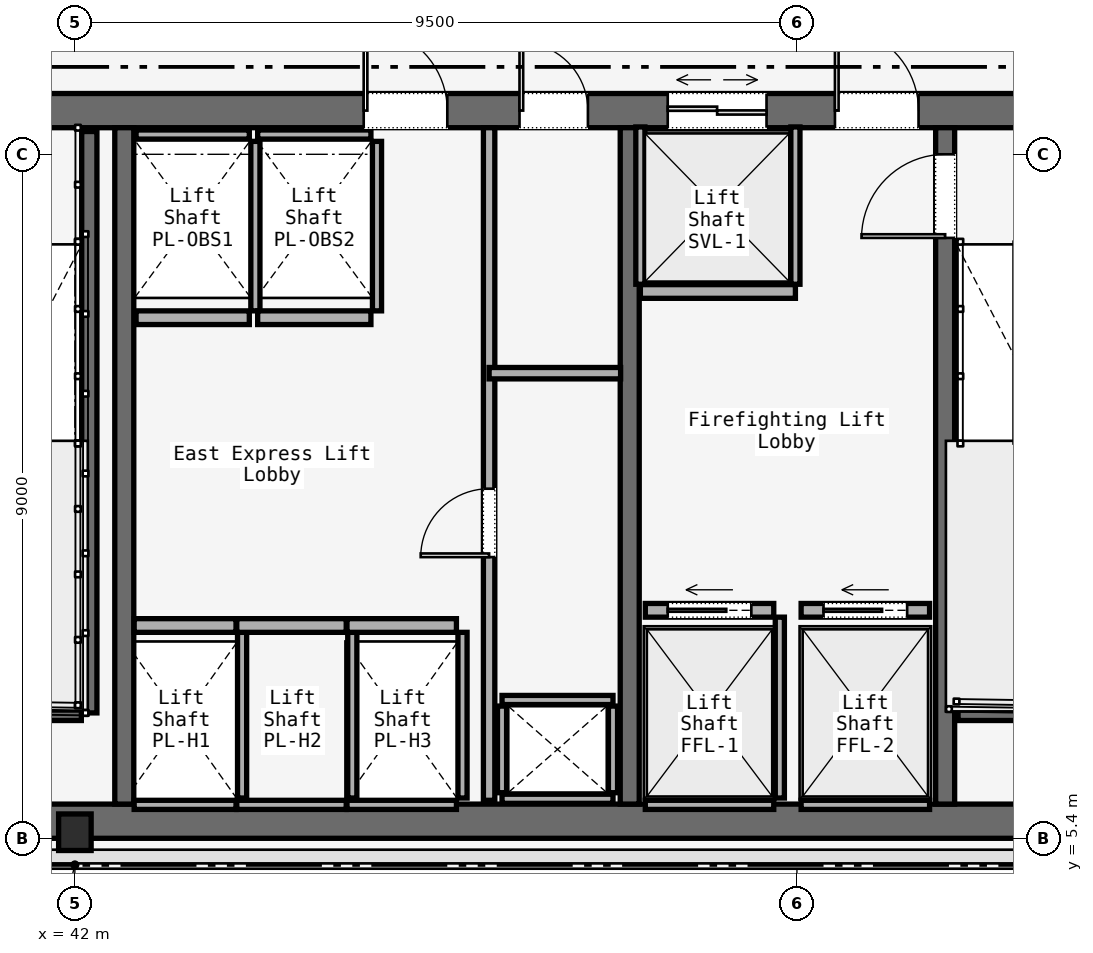
"""IFC4 building model, lengths in metres.
Left out: names, types, materials, properties, quantities, classifications, styles, units other than length and angle.
Written with IfcOpenShell. Run it as: python <this file> out.ifc"""

import sys

from ifc_helpers import new_model, si_unit, direction, frame, frame_2d, origin, origin_2d, place, context, subcontext, project, spatial, rectangle, i_section, extrude, element, fill, save


model = new_model("IFC4")
c1 = context("Model", 3, precision=1e-05, world=origin(), true_north=direction((0.0, 1.0)))
c2 = subcontext(c1, "Body", "Model", "MODEL_VIEW")
j1 = project(units=[si_unit("LENGTHUNIT", "METRE"), si_unit("PLANEANGLEUNIT", "RADIAN")], contexts=[c1])
p1 = place(None, origin())
s1 = spatial("IfcSite", under=j1, at=p1, CompositionType="ELEMENT")
p2 = place(p1, origin())
s2 = spatial("IfcBuilding", under=s1, at=p2, CompositionType="ELEMENT")
p3 = place(p2, frame((0.0, 0.0, 138.4)))
s3 = spatial("IfcBuildingStorey", under=s2, at=p3, CompositionType="ELEMENT", Elevation=138.4)
p4 = place(p3, frame((26.45, 14.975, 0.0), z_axis=(0.0, 0.0, 1.0), x_axis=(1.0, 0.0, 0.0)))
e1 = element("IfcWall", 1, at=p4, inside=s3, PredefinedType="SOLIDWALL", context=c2, shape_type="SweptSolid", body=[
    extrude(rectangle(XDim=31.1, YDim=0.45, at=frame_2d((15.55, 0.0))), origin(), (0.0, 0.0, 1.0), 3.58),
])
p5 = place(p4, frame((1.65, 0.0, 0.0)))
e2 = element("IfcOpeningElement", 2, at=p5, cuts=e1, PredefinedType="OPENING", context=c2, shape_type="SweptSolid", body=[
    extrude(rectangle(XDim=1.1, YDim=2.2, at=frame_2d((0.55, 1.1))), frame((0.0, 0.225, 0.0), z_axis=(0.0, -1.0, 0.0), x_axis=(1.0, 0.0, 0.0)), (0.0, 0.0, 1.0), 0.45),
])
p6 = place(p4, frame((13.65, 0.0, 0.0)))
e3 = element("IfcOpeningElement", 3, at=p6, cuts=e1, PredefinedType="OPENING", context=c2, shape_type="SweptSolid", body=[
    extrude(rectangle(XDim=1.1, YDim=2.2, at=frame_2d((0.55, 1.1))), frame((0.0, 0.225, 0.0), z_axis=(0.0, -1.0, 0.0), x_axis=(1.0, 0.0, 0.0)), (0.0, 0.0, 1.0), 0.45),
])
p7 = place(p4, frame((25.55, 0.0, 0.0)))
e4 = element("IfcOpeningElement", 4, at=p7, cuts=e1, PredefinedType="OPENING", context=c2, shape_type="SweptSolid", body=[
    extrude(rectangle(XDim=1.1, YDim=2.2, at=frame_2d((0.55, 1.1))), frame((0.0, 0.225, 0.0), z_axis=(0.0, -1.0, 0.0), x_axis=(1.0, 0.0, 0.0)), (0.0, 0.0, 1.0), 0.45),
])
p8 = place(p4, frame((10.7, 0.0, 0.0)))
e5 = element("IfcOpeningElement", 5, at=p8, cuts=e1, PredefinedType="OPENING", context=c2, shape_type="SweptSolid", body=[
    extrude(rectangle(XDim=1.4, YDim=2.2, at=frame_2d((0.7, 1.1))), frame((0.0, 0.225, 0.0), z_axis=(0.0, -1.0, 0.0), x_axis=(1.0, 0.0, 0.0)), (0.0, 0.0, 1.0), 0.45),
])
p9 = place(p4, frame((19.35, 0.0, 0.0)))
e6 = element("IfcOpeningElement", 6, at=p9, cuts=e1, PredefinedType="OPENING", context=c2, shape_type="SweptSolid", body=[
    extrude(rectangle(XDim=1.1, YDim=2.2, at=frame_2d((0.55, 1.1))), frame((0.0, 0.225, 0.0), z_axis=(0.0, -1.0, 0.0), x_axis=(1.0, 0.0, 0.0)), (0.0, 0.0, 1.0), 0.45),
])
p10 = place(p4, frame((21.4, 0.0, 0.0)))
e7 = element("IfcOpeningElement", 7, at=p10, cuts=e1, PredefinedType="OPENING", context=c2, shape_type="SweptSolid", body=[
    extrude(rectangle(XDim=0.9, YDim=2.1, at=frame_2d((0.45, 1.05))), frame((0.0, 0.225, 0.0), z_axis=(0.0, -1.0, 0.0), x_axis=(1.0, 0.0, 0.0)), (0.0, 0.0, 1.0), 0.45),
])
p11 = place(p4, frame((23.35, 0.0, 0.0)))
e8 = element("IfcOpeningElement", 8, at=p11, cuts=e1, PredefinedType="OPENING", context=c2, shape_type="SweptSolid", body=[
    extrude(rectangle(XDim=1.3, YDim=2.3, at=frame_2d((0.65, 1.15))), frame((0.0, 0.225, 0.0), z_axis=(0.0, -1.0, 0.0), x_axis=(1.0, 0.0, 0.0)), (0.0, 0.0, 1.0), 0.45),
])
p12 = place(p3, frame((26.45, 5.625, 0.0), z_axis=(0.0, 0.0, 1.0), x_axis=(1.0, 0.0, 0.0)))
e9 = element("IfcWall", 9, at=p12, inside=s3, PredefinedType="SOLIDWALL", context=c2, shape_type="SweptSolid", body=[
    extrude(rectangle(XDim=31.1, YDim=0.45, at=frame_2d((15.55, 0.0))), origin(), (0.0, 0.0, 1.0), 3.58),
])
for number, where, z_axis, x_axis in (
    (10, (42.65, 5.85, 0.0), (0.0, 0.0, 1.0), (0.0, 1.0, 0.0)),
    (11, (49.3, 5.85, 0.0), (0.0, 0.0, 1.0), (0.0, 1.0, 0.0)),
):
    element("IfcWall", number, at=place(p3, frame(where, z_axis=z_axis, x_axis=x_axis)), inside=s3, PredefinedType="SOLIDWALL", context=c2, shape_type="SweptSolid", body=[
        extrude(rectangle(XDim=8.9, YDim=0.25, at=frame_2d((4.45, 0.0))), origin(), (0.0, 0.0, 1.0), 3.58),
    ])
p13 = place(p3, frame((53.45, 5.85, 0.0), z_axis=(0.0, 0.0, 1.0), x_axis=(0.0, 1.0, 0.0)))
e12 = element("IfcWall", 12, at=p13, inside=s3, PredefinedType="SOLIDWALL", context=c2, shape_type="SweptSolid", body=[
    extrude(rectangle(XDim=8.9, YDim=0.25, at=frame_2d((4.45, 0.0))), origin(), (0.0, 0.0, 1.0), 3.58),
])
p14 = place(p13, frame((7.45, 0.0, 0.0)))
e13 = element("IfcOpeningElement", 13, at=p14, cuts=e12, PredefinedType="OPENING", context=c2, shape_type="SweptSolid", body=[
    extrude(rectangle(XDim=1.1, YDim=2.2, at=frame_2d((0.55, 1.1))), frame((0.0, 0.125, 0.0), z_axis=(0.0, -1.0, 0.0), x_axis=(1.0, 0.0, 0.0)), (0.0, 0.0, 1.0), 0.25),
])
p15 = place(p3, frame((42.0, 5.48, 0.0), z_axis=(0.0, 0.0, 1.0), x_axis=(1.0, 0.0, 0.0)))
e14 = element("IfcColumn", 14, at=p15, inside=s3, PredefinedType="COLUMN", context=c2, shape_type="SweptSolid", body=[
    extrude(i_section(OverallWidth=0.428, OverallDepth=0.481, WebThickness=0.051, FlangeThickness=0.065, FilletRadius=0.015, at=origin_2d()), origin(), (0.0, 0.0, 1.0), 3.58),
])
p16 = place(p3, frame((42.19, 14.7, 0.0), z_axis=(0.0, 0.0, 1.0), x_axis=(0.0, -1.0, 0.0)))
e15 = element("IfcWall", 15, at=p16, inside=s3, PredefinedType="SOLIDWALL", context=c2, shape_type="SweptSolid", body=[
    extrude(rectangle(XDim=7.65, YDim=0.2, at=frame_2d((3.825, 0.0))), origin(), (0.0, 0.0, 1.0), 3.8),
])
for number, where, z_axis, x_axis in (
    (16, (38.97, 7.05, 0.0), (0.0, 0.0, 1.0), (1.0, 0.0, 0.0)),
    (17, (53.62, 7.05, 0.0), (0.0, 0.0, 1.0), (1.0, 0.0, 0.0)),
):
    element("IfcWall", number, at=place(p3, frame(where, z_axis=z_axis, x_axis=x_axis)), inside=s3, PredefinedType="SOLIDWALL", context=c2, shape_type="SweptSolid", body=[
        extrude(rectangle(XDim=3.115, YDim=0.2, at=frame_2d((1.558, 0.0))), origin(), (0.0, 0.0, 1.0), 3.8),
    ])
for number, where, z_axis, x_axis in (
    (18, (47.62, 5.92, 0.0), (0.0, 0.0, 1.0), (1.0, 0.0, 0.0)),
    (19, (47.62, 7.22, 0.0), (0.0, 0.0, 1.0), (1.0, 0.0, 0.0)),
):
    element("IfcWall", number, at=place(p3, frame(where, z_axis=z_axis, x_axis=x_axis)), inside=s3, PredefinedType="SOLIDWALL", context=c2, shape_type="SweptSolid", body=[
        extrude(rectangle(XDim=1.46, YDim=0.12, at=frame_2d((0.73, 0.0))), origin(), (0.0, 0.0, 1.0), 3.01),
    ])
for number, where, z_axis, x_axis in (
    (20, (47.62, 6.0, 0.0), (0.0, 0.0, 1.0), (0.0, 1.0, 0.0)),
    (21, (49.08, 6.0, 0.0), (0.0, 0.0, 1.0), (0.0, 1.0, 0.0)),
):
    element("IfcWall", number, at=place(p3, frame(where, z_axis=z_axis, x_axis=x_axis)), inside=s3, PredefinedType="SOLIDWALL", context=c2, shape_type="SweptSolid", body=[
        extrude(rectangle(XDim=1.14, YDim=0.12, at=frame_2d((0.57, 0.0))), origin(), (0.0, 0.0, 1.0), 3.01),
    ])
p17 = place(p3, frame((47.45, 5.9, 0.0), z_axis=(0.0, 0.0, 1.0), x_axis=(0.0, 1.0, 0.0)))
e22 = element("IfcWall", 22, at=p17, inside=s3, PredefinedType="PARTITIONING", context=c2, shape_type="SweptSolid", body=[
    extrude(rectangle(XDim=8.85, YDim=0.15, at=frame_2d((4.425, 0.0))), origin(), (0.0, 0.0, 1.0), 3.01),
])
p18 = place(p17, frame((3.2, 0.0, 0.0)))
e23 = element("IfcOpeningElement", 23, at=p18, cuts=e22, PredefinedType="OPENING", context=c2, shape_type="SweptSolid", body=[
    extrude(rectangle(XDim=0.9, YDim=2.1, at=frame_2d((0.45, 1.05))), frame((0.0, 0.075, 0.0), z_axis=(0.0, -1.0, 0.0), x_axis=(1.0, 0.0, 0.0)), (0.0, 0.0, 1.0), 0.15),
])
p19 = place(p3, frame((47.45, 11.52, 0.0), z_axis=(0.0, 0.0, 1.0), x_axis=(1.0, 0.0, 0.0)))
e24 = element("IfcWall", 24, at=p19, inside=s3, PredefinedType="PARTITIONING", context=c2, shape_type="SweptSolid", body=[
    extrude(rectangle(XDim=1.73, YDim=0.15, at=frame_2d((0.865, 0.0))), origin(), (0.0, 0.0, 1.0), 3.01),
])
p20 = place(p3, frame((42.78, 8.2, 0.0), z_axis=(0.0, 0.0, 1.0), x_axis=(1.0, 0.0, 0.0)))
e25 = element("IfcWall", 25, at=p20, inside=s3, PredefinedType="SOLIDWALL", context=c2, shape_type="SweptSolid", body=[
    extrude(rectangle(XDim=1.34, YDim=0.18, at=frame_2d((0.67, 0.0))), origin(), (0.0, 0.0, 1.0), 3.01),
])
p21 = place(p3, frame((42.78, 5.84, 0.0), z_axis=(0.0, 0.0, 1.0), x_axis=(1.0, 0.0, 0.0)))
e26 = element("IfcWall", 26, at=p21, inside=s3, PredefinedType="SOLIDWALL", context=c2, shape_type="SweptSolid", body=[
    extrude(rectangle(XDim=1.34, YDim=0.12, at=frame_2d((0.67, 0.0))), origin(), (0.0, 0.0, 1.0), 3.01),
])
p22 = place(p3, frame((44.2, 5.93, 0.0), z_axis=(0.0, 0.0, 1.0), x_axis=(0.0, 1.0, 0.0)))
e27 = element("IfcWall", 27, at=p22, inside=s3, PredefinedType="SOLIDWALL", context=c2, shape_type="SweptSolid", body=[
    extrude(rectangle(XDim=2.18, YDim=0.12, at=frame_2d((1.09, 0.0))), origin(), (0.0, 0.0, 1.0), 3.01),
])
p23 = place(p3, frame((44.13, 8.2, 0.0), z_axis=(0.0, 0.0, 1.0), x_axis=(1.0, 0.0, 0.0)))
e28 = element("IfcWall", 28, at=p23, inside=s3, PredefinedType="SOLIDWALL", context=c2, shape_type="SweptSolid", body=[
    extrude(rectangle(XDim=1.44, YDim=0.18, at=frame_2d((0.72, 0.0))), origin(), (0.0, 0.0, 1.0), 3.01),
])
p24 = place(p3, frame((44.13, 5.84, 0.0), z_axis=(0.0, 0.0, 1.0), x_axis=(1.0, 0.0, 0.0)))
e29 = element("IfcWall", 29, at=p24, inside=s3, PredefinedType="SOLIDWALL", context=c2, shape_type="SweptSolid", body=[
    extrude(rectangle(XDim=1.44, YDim=0.12, at=frame_2d((0.72, 0.0))), origin(), (0.0, 0.0, 1.0), 3.01),
])
p25 = place(p3, frame((45.65, 5.93, 0.0), z_axis=(0.0, 0.0, 1.0), x_axis=(0.0, 1.0, 0.0)))
e30 = element("IfcWall", 30, at=p25, inside=s3, PredefinedType="SOLIDWALL", context=c2, shape_type="SweptSolid", body=[
    extrude(rectangle(XDim=2.18, YDim=0.12, at=frame_2d((1.09, 0.0))), origin(), (0.0, 0.0, 1.0), 3.01),
])
p26 = place(p3, frame((45.58, 8.2, 0.0), z_axis=(0.0, 0.0, 1.0), x_axis=(1.0, 0.0, 0.0)))
e31 = element("IfcWall", 31, at=p26, inside=s3, PredefinedType="SOLIDWALL", context=c2, shape_type="SweptSolid", body=[
    extrude(rectangle(XDim=1.44, YDim=0.18, at=frame_2d((0.72, 0.0))), origin(), (0.0, 0.0, 1.0), 3.01),
])
p27 = place(p3, frame((45.58, 5.84, 0.0), z_axis=(0.0, 0.0, 1.0), x_axis=(1.0, 0.0, 0.0)))
e32 = element("IfcWall", 32, at=p27, inside=s3, PredefinedType="SOLIDWALL", context=c2, shape_type="SweptSolid", body=[
    extrude(rectangle(XDim=1.44, YDim=0.12, at=frame_2d((0.72, 0.0))), origin(), (0.0, 0.0, 1.0), 3.01),
])
p28 = place(p3, frame((47.1, 5.93, 0.0), z_axis=(0.0, 0.0, 1.0), x_axis=(0.0, 1.0, 0.0)))
e33 = element("IfcWall", 33, at=p28, inside=s3, PredefinedType="SOLIDWALL", context=c2, shape_type="SweptSolid", body=[
    extrude(rectangle(XDim=2.18, YDim=0.12, at=frame_2d((1.09, 0.0))), origin(), (0.0, 0.0, 1.0), 3.01),
])
p29 = place(p3, frame((42.805, 12.25, 0.0), z_axis=(0.0, 0.0, 1.0), x_axis=(1.0, 0.0, 0.0)))
e34 = element("IfcWall", 34, at=p29, inside=s3, PredefinedType="SOLIDWALL", context=c2, shape_type="SweptSolid", body=[
    extrude(rectangle(XDim=1.49, YDim=0.18, at=frame_2d((0.745, 0.0))), origin(), (0.0, 0.0, 1.0), 3.01),
])
p30 = place(p3, frame((42.805, 14.66, 0.0), z_axis=(0.0, 0.0, 1.0), x_axis=(1.0, 0.0, 0.0)))
e35 = element("IfcWall", 35, at=p30, inside=s3, PredefinedType="SOLIDWALL", context=c2, shape_type="SweptSolid", body=[
    extrude(rectangle(XDim=1.49, YDim=0.12, at=frame_2d((0.745, 0.0))), origin(), (0.0, 0.0, 1.0), 3.01),
])
p31 = place(p3, frame((44.375, 12.34, 0.0), z_axis=(0.0, 0.0, 1.0), x_axis=(0.0, 1.0, 0.0)))
e36 = element("IfcWall", 36, at=p31, inside=s3, PredefinedType="SOLIDWALL", context=c2, shape_type="SweptSolid", body=[
    extrude(rectangle(XDim=2.23, YDim=0.12, at=frame_2d((1.115, 0.0))), origin(), (0.0, 0.0, 1.0), 3.01),
])
p32 = place(p3, frame((44.405, 12.25, 0.0), z_axis=(0.0, 0.0, 1.0), x_axis=(1.0, 0.0, 0.0)))
e37 = element("IfcWall", 37, at=p32, inside=s3, PredefinedType="SOLIDWALL", context=c2, shape_type="SweptSolid", body=[
    extrude(rectangle(XDim=1.49, YDim=0.18, at=frame_2d((0.745, 0.0))), origin(), (0.0, 0.0, 1.0), 3.01),
])
p33 = place(p3, frame((44.405, 14.66, 0.0), z_axis=(0.0, 0.0, 1.0), x_axis=(1.0, 0.0, 0.0)))
e38 = element("IfcWall", 38, at=p33, inside=s3, PredefinedType="SOLIDWALL", context=c2, shape_type="SweptSolid", body=[
    extrude(rectangle(XDim=1.49, YDim=0.12, at=frame_2d((0.745, 0.0))), origin(), (0.0, 0.0, 1.0), 3.01),
])
p34 = place(p3, frame((45.975, 12.34, 0.0), z_axis=(0.0, 0.0, 1.0), x_axis=(0.0, 1.0, 0.0)))
e39 = element("IfcWall", 39, at=p34, inside=s3, PredefinedType="SOLIDWALL", context=c2, shape_type="SweptSolid", body=[
    extrude(rectangle(XDim=2.23, YDim=0.12, at=frame_2d((1.115, 0.0))), origin(), (0.0, 0.0, 1.0), 3.01),
])
p35 = place(p3, frame((49.505, 8.4, 0.0), z_axis=(0.0, 0.0, 1.0), x_axis=(1.0, 0.0, 0.0)))
e40 = element("IfcWall", 40, at=p35, inside=s3, PredefinedType="SOLIDWALL", context=c2, shape_type="SweptSolid", body=[
    extrude(rectangle(XDim=1.69, YDim=0.18, at=frame_2d((0.845, 0.0))), origin(), (0.0, 0.0, 1.0), 3.01),
])
p36 = place(p35, frame((0.295, 0.0, 0.0)))
e41 = element("IfcOpeningElement", 41, at=p36, cuts=e40, PredefinedType="OPENING", context=c2, shape_type="SweptSolid", body=[
    extrude(rectangle(XDim=1.1, YDim=2.2, at=frame_2d((0.55, 1.1))), frame((0.0, 0.09, 0.0), z_axis=(0.0, -1.0, 0.0), x_axis=(1.0, 0.0, 0.0)), (0.0, 0.0, 1.0), 0.18),
])
p37 = place(p3, frame((49.505, 5.84, 0.0), z_axis=(0.0, 0.0, 1.0), x_axis=(1.0, 0.0, 0.0)))
e42 = element("IfcWall", 42, at=p37, inside=s3, PredefinedType="SOLIDWALL", context=c2, shape_type="SweptSolid", body=[
    extrude(rectangle(XDim=1.69, YDim=0.12, at=frame_2d((0.845, 0.0))), origin(), (0.0, 0.0, 1.0), 3.01),
])
p38 = place(p3, frame((51.275, 5.93, 0.0), z_axis=(0.0, 0.0, 1.0), x_axis=(0.0, 1.0, 0.0)))
e43 = element("IfcWall", 43, at=p38, inside=s3, PredefinedType="SOLIDWALL", context=c2, shape_type="SweptSolid", body=[
    extrude(rectangle(XDim=2.38, YDim=0.12, at=frame_2d((1.19, 0.0))), origin(), (0.0, 0.0, 1.0), 3.01),
])
p39 = place(p3, frame((51.555, 8.4, 0.0), z_axis=(0.0, 0.0, 1.0), x_axis=(1.0, 0.0, 0.0)))
e44 = element("IfcWall", 44, at=p39, inside=s3, PredefinedType="SOLIDWALL", context=c2, shape_type="SweptSolid", body=[
    extrude(rectangle(XDim=1.69, YDim=0.18, at=frame_2d((0.845, 0.0))), origin(), (0.0, 0.0, 1.0), 3.01),
])
p40 = place(p39, frame((0.295, 0.0, 0.0)))
e45 = element("IfcOpeningElement", 45, at=p40, cuts=e44, PredefinedType="OPENING", context=c2, shape_type="SweptSolid", body=[
    extrude(rectangle(XDim=1.1, YDim=2.2, at=frame_2d((0.55, 1.1))), frame((0.0, 0.09, 0.0), z_axis=(0.0, -1.0, 0.0), x_axis=(1.0, 0.0, 0.0)), (0.0, 0.0, 1.0), 0.18),
])
p41 = place(p3, frame((51.555, 5.84, 0.0), z_axis=(0.0, 0.0, 1.0), x_axis=(1.0, 0.0, 0.0)))
e46 = element("IfcWall", 46, at=p41, inside=s3, PredefinedType="SOLIDWALL", context=c2, shape_type="SweptSolid", body=[
    extrude(rectangle(XDim=1.69, YDim=0.12, at=frame_2d((0.845, 0.0))), origin(), (0.0, 0.0, 1.0), 3.01),
])
p42 = place(p3, frame((49.44, 12.595, 0.0), z_axis=(0.0, 0.0, 1.0), x_axis=(1.0, 0.0, 0.0)))
e47 = element("IfcWall", 47, at=p42, inside=s3, PredefinedType="SOLIDWALL", context=c2, shape_type="SweptSolid", body=[
    extrude(rectangle(XDim=2.04, YDim=0.18, at=frame_2d((1.02, 0.0))), origin(), (0.0, 0.0, 1.0), 3.01),
])
for number, where, z_axis, x_axis in (
    (48, (49.44, 12.69, 0.0), (0.0, 0.0, 1.0), (0.0, 1.0, 0.0)),
    (49, (51.48, 12.69, 0.0), (0.0, 0.0, 1.0), (0.0, 1.0, 0.0)),
):
    element("IfcWall", number, at=place(p3, frame(where, z_axis=z_axis, x_axis=x_axis)), inside=s3, PredefinedType="SOLIDWALL", context=c2, shape_type="SweptSolid", body=[
        extrude(rectangle(XDim=2.07, YDim=0.12, at=frame_2d((1.035, 0.0))), origin(), (0.0, 0.0, 1.0), 3.01),
    ])
p43 = place(p7, origin())
e50 = element("IfcDoor", 50, at=p43, inside=s3, OperationType="SINGLE_SWING_RIGHT", PredefinedType="DOOR", context=c2, shape_type="SweptSolid", body=[
    extrude(rectangle(XDim=1.1, YDim=2.2, at=frame_2d((0.55, 1.1))), frame((0.0, 0.025, 0.0), z_axis=(0.0, -1.0, 0.0), x_axis=(1.0, 0.0, 0.0)), (0.0, 0.0, 1.0), 0.05),
])
fill(e4, e50)
p44 = place(p9, origin())
e51 = element("IfcDoor", 51, at=p44, inside=s3, OperationType="SINGLE_SWING_LEFT", PredefinedType="DOOR", context=c2, shape_type="SweptSolid", body=[
    extrude(rectangle(XDim=1.1, YDim=2.2, at=frame_2d((0.55, 1.1))), frame((0.0, 0.025, 0.0), z_axis=(0.0, -1.0, 0.0), x_axis=(1.0, 0.0, 0.0)), (0.0, 0.0, 1.0), 0.05),
])
fill(e6, e51)
p45 = place(p10, origin())
e52 = element("IfcDoor", 52, at=p45, inside=s3, OperationType="SINGLE_SWING_LEFT", PredefinedType="DOOR", context=c2, shape_type="SweptSolid", body=[
    extrude(rectangle(XDim=0.9, YDim=2.1, at=frame_2d((0.45, 1.05))), frame((0.0, 0.025, 0.0), z_axis=(0.0, -1.0, 0.0), x_axis=(1.0, 0.0, 0.0)), (0.0, 0.0, 1.0), 0.05),
])
fill(e7, e52)
p46 = place(p14, origin())
e53 = element("IfcDoor", 53, at=p46, inside=s3, OperationType="SINGLE_SWING_LEFT", PredefinedType="DOOR", context=c2, shape_type="SweptSolid", body=[
    extrude(rectangle(XDim=1.1, YDim=2.2, at=frame_2d((0.55, 1.1))), frame((0.0, 0.025, 0.0), z_axis=(0.0, -1.0, 0.0), x_axis=(1.0, 0.0, 0.0)), (0.0, 0.0, 1.0), 0.05),
])
fill(e13, e53)
p47 = place(p18, origin())
e54 = element("IfcDoor", 54, at=p47, inside=s3, OperationType="SINGLE_SWING_LEFT", PredefinedType="DOOR", context=c2, shape_type="SweptSolid", body=[
    extrude(rectangle(XDim=0.9, YDim=2.1, at=frame_2d((0.45, 1.05))), frame((0.0, 0.025, 0.0), z_axis=(0.0, -1.0, 0.0), x_axis=(1.0, 0.0, 0.0)), (0.0, 0.0, 1.0), 0.05),
])
fill(e23, e54)
p48 = place(p36, origin())
e55 = element("IfcDoor", 55, at=p48, inside=s3, OperationType="SLIDING_TO_LEFT", PredefinedType="DOOR", context=c2, shape_type="SweptSolid", body=[
    extrude(rectangle(XDim=1.1, YDim=2.2, at=frame_2d((0.55, 1.1))), frame((0.0, 0.025, 0.0), z_axis=(0.0, -1.0, 0.0), x_axis=(1.0, 0.0, 0.0)), (0.0, 0.0, 1.0), 0.05),
])
fill(e41, e55)
p49 = place(p40, origin())
e56 = element("IfcDoor", 56, at=p49, inside=s3, OperationType="SLIDING_TO_LEFT", PredefinedType="DOOR", context=c2, shape_type="SweptSolid", body=[
    extrude(rectangle(XDim=1.1, YDim=2.2, at=frame_2d((0.55, 1.1))), frame((0.0, 0.025, 0.0), z_axis=(0.0, -1.0, 0.0), x_axis=(1.0, 0.0, 0.0)), (0.0, 0.0, 1.0), 0.05),
])
fill(e45, e56)
p50 = place(p11, origin())
e57 = element("IfcDoor", 57, at=p50, inside=s3, OperationType="DOUBLE_DOOR_SLIDING", PredefinedType="DOOR", context=c2, shape_type="SweptSolid", body=[
    extrude(rectangle(XDim=1.3, YDim=2.3, at=frame_2d((0.65, 1.15))), frame((0.0, 0.025, 0.0), z_axis=(0.0, -1.0, 0.0), x_axis=(1.0, 0.0, 0.0)), (0.0, 0.0, 1.0), 0.05),
])
fill(e8, e57)
save(model, sys.argv[1])
